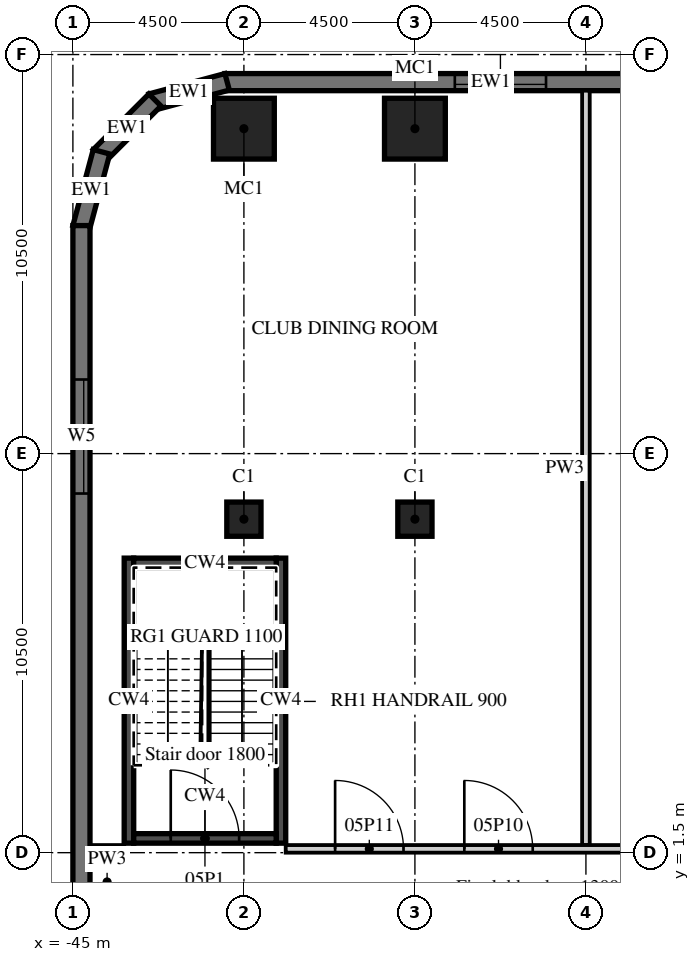
"""IFC4 building model, lengths in metres.
Left out: names, types, materials, properties, quantities, classifications, styles, units other than length and angle.
Written with IfcOpenShell. Run it as: python <this file> out.ifc"""

import sys

from ifc_helpers import new_model, si_unit, direction, frame, frame_2d, origin, origin_2d, place, context, subcontext, project, spatial, polyline, rectangle, outline, extrude, element, fill, save


model = new_model("IFC4")
c1 = context("Model", 3, precision=1e-05, world=origin(), true_north=direction((0.0, 1.0)))
c2 = subcontext(c1, "Body", "Model", "MODEL_VIEW")
j1 = project(units=[si_unit("LENGTHUNIT", "METRE"), si_unit("PLANEANGLEUNIT", "RADIAN")], contexts=[c1])
p1 = place(None, origin())
s1 = spatial("IfcSite", under=j1, at=p1, CompositionType="ELEMENT")
p2 = place(p1, origin())
s2 = spatial("IfcBuilding", under=s1, at=p2, CompositionType="ELEMENT")
p3 = place(p2, frame((0.0, 0.0, 33.5)))
s3 = spatial("IfcBuildingStorey", under=s2, at=p3, CompositionType="ELEMENT", Elevation=33.5)
for number, where, z_axis, x_axis in (
    (1, (-40.5, 20.55, 0.0), (0.0, 0.0, 1.0), (1.0, 0.0, 0.0)),
    (2, (-36.0, 20.55, 0.0), (0.0, 0.0, 1.0), (1.0, 0.0, 0.0)),
):
    element("IfcColumn", number, at=place(p3, frame(where, z_axis=z_axis, x_axis=x_axis)), inside=s3, PredefinedType="COLUMN", context=c2, shape_type="SweptSolid", body=[
        extrude(rectangle(XDim=1.6, YDim=1.6, at=origin_2d()), origin(), (0.0, 0.0, 1.0), 4.5),
    ])
for number, where, z_axis, x_axis in (
    (3, (-40.5, 10.275, 0.0), (0.0, 0.0, 1.0), (1.0, 0.0, 0.0)),
    (4, (-36.0, 10.275, 0.0), (0.0, 0.0, 1.0), (1.0, 0.0, 0.0)),
):
    element("IfcColumn", number, at=place(p3, frame(where, z_axis=z_axis, x_axis=x_axis)), inside=s3, PredefinedType="COLUMN", context=c2, shape_type="SweptSolid", body=[
        extrude(rectangle(XDim=0.9, YDim=0.9, at=origin_2d()), origin(), (0.0, 0.0, 1.0), 4.5),
    ])
p4 = place(p3, frame((-27.0, 21.775, 0.0), z_axis=(0.0, 0.0, 1.0), x_axis=(-1.0, 0.0, 0.0)))
e5 = element("IfcWall", 5, at=p4, inside=s3, PredefinedType="SOLIDWALL", context=c2, shape_type="SweptSolid", body=[
    extrude(rectangle(XDim=14.0, YDim=0.45, at=frame_2d((7.0, 0.0))), origin(), (0.0, 0.0, 1.0), 4.05),
])
p5 = place(p4, frame((1.05, 0.0, 0.9)))
e6 = element("IfcOpeningElement", 6, at=p5, cuts=e5, PredefinedType="OPENING", context=c2, shape_type="SweptSolid", body=[
    extrude(rectangle(XDim=2.4, YDim=1.8, at=frame_2d((1.2, 0.9))), frame((0.0, 0.235, 0.0), z_axis=(0.0, -1.0, 0.0), x_axis=(1.0, 0.0, 0.0)), (0.0, 0.0, 1.0), 0.47),
])
p6 = place(p4, frame((5.55, 0.0, 0.9)))
e7 = element("IfcOpeningElement", 7, at=p6, cuts=e5, PredefinedType="OPENING", context=c2, shape_type="SweptSolid", body=[
    extrude(rectangle(XDim=2.4, YDim=1.8, at=frame_2d((1.2, 0.9))), frame((0.0, 0.235, 0.0), z_axis=(0.0, -1.0, 0.0), x_axis=(1.0, 0.0, 0.0)), (0.0, 0.0, 1.0), 0.47),
])
p7 = place(p3, frame((-40.942, 21.783, 0.0), z_axis=(0.0, 0.0, 1.0), x_axis=(-0.965926999034, -0.25881466832, 0.0)))
e8 = element("IfcWall", 8, at=p7, inside=s3, PredefinedType="SOLIDWALL", context=c2, shape_type="SweptSolid", body=[
    extrude(outline(polyline([(0.0, -0.225), (2.071, -0.225), (1.95, 0.225), (0.121, 0.225), (0.0, -0.225)])), origin(), (0.0, 0.0, 1.0), 4.05),
])
p8 = place(p3, frame((-42.841, 21.305, 0.0), z_axis=(0.0, 0.0, 1.0), x_axis=(-0.707106781187, -0.707106781187, 0.0)))
e9 = element("IfcWall", 9, at=p8, inside=s3, PredefinedType="SOLIDWALL", context=c2, shape_type="SweptSolid", body=[
    extrude(outline(polyline([(0.0, -0.225), (2.071, -0.225), (1.95, 0.225), (0.121, 0.225), (0.0, -0.225)])), origin(), (0.0, 0.0, 1.0), 4.05),
])
p9 = place(p3, frame((-44.247, 19.942, 0.0), z_axis=(0.0, 0.0, 1.0), x_axis=(-0.25881466832, -0.965926999034, 0.0)))
e10 = element("IfcWall", 10, at=p9, inside=s3, PredefinedType="SOLIDWALL", context=c2, shape_type="SweptSolid", body=[
    extrude(outline(polyline([(-0.0, -0.225), (2.07, -0.225), (1.95, 0.225), (0.12, 0.225), (-0.0, -0.225)])), origin(), (0.0, 0.0, 1.0), 4.05),
])
p10 = place(p3, frame((-44.775, 18.0, 0.0), z_axis=(0.0, 0.0, 1.0), x_axis=(0.0, -1.0, 0.0)))
e11 = element("IfcWall", 11, at=p10, inside=s3, PredefinedType="SOLIDWALL", context=c2, shape_type="SweptSolid", body=[
    extrude(rectangle(XDim=36.0, YDim=0.45, at=frame_2d((18.0, 0.0))), origin(), (0.0, 0.0, 1.0), 4.05),
])
p11 = place(p10, frame((4.05, 0.0, 0.9)))
e12 = element("IfcOpeningElement", 12, at=p11, cuts=e11, PredefinedType="OPENING", context=c2, shape_type="SweptSolid", body=[
    extrude(rectangle(XDim=3.0, YDim=1.8, at=frame_2d((1.5, 0.9))), frame((0.0, 0.235, 0.0), z_axis=(0.0, -1.0, 0.0), x_axis=(1.0, 0.0, 0.0)), (0.0, 0.0, 1.0), 0.47),
])
for number, where, z_axis, x_axis in (
    (13, (-43.525, 1.75, 0.0), (0.0, 0.0, 1.0), (0.0, 1.0, 0.0)),
    (14, (-39.525, 1.75, 0.0), (0.0, 0.0, 1.0), (0.0, 1.0, 0.0)),
):
    element("IfcWall", number, at=place(p3, frame(where, z_axis=z_axis, x_axis=x_axis)), inside=s3, PredefinedType="SHEAR", context=c2, shape_type="SweptSolid", body=[
        extrude(rectangle(XDim=7.5, YDim=0.25, at=frame_2d((3.75, 0.0))), origin(), (0.0, 0.0, 1.0), 4.05),
    ])
p12 = place(p3, frame((-43.4, 9.125, 0.0), z_axis=(0.0, 0.0, 1.0), x_axis=(1.0, 0.0, 0.0)))
e15 = element("IfcWall", 15, at=p12, inside=s3, PredefinedType="SHEAR", context=c2, shape_type="SweptSolid", body=[
    extrude(rectangle(XDim=3.75, YDim=0.25, at=frame_2d((1.875, 0.0))), origin(), (0.0, 0.0, 1.0), 4.05),
])
p13 = place(p3, frame((-43.4, 1.875, 0.0), z_axis=(0.0, 0.0, 1.0), x_axis=(1.0, 0.0, 0.0)))
e16 = element("IfcWall", 16, at=p13, inside=s3, PredefinedType="SHEAR", context=c2, shape_type="SweptSolid", body=[
    extrude(rectangle(XDim=3.75, YDim=0.25, at=frame_2d((1.875, 0.0))), origin(), (0.0, 0.0, 1.0), 4.05),
])
p14 = place(p13, frame((0.975, 0.0, 0.0)))
e17 = element("IfcOpeningElement", 17, at=p14, cuts=e16, PredefinedType="OPENING", context=c2, shape_type="SweptSolid", body=[
    extrude(rectangle(XDim=1.8, YDim=2.1, at=frame_2d((0.9, 1.05))), frame((0.0, 0.135, 0.0), z_axis=(0.0, -1.0, 0.0), x_axis=(1.0, 0.0, 0.0)), (0.0, 0.0, 1.0), 0.27),
])
p15 = place(p3, frame((-31.5, 1.7, 0.0), z_axis=(0.0, 0.0, 1.0), x_axis=(0.0, 1.0, 0.0)))
e18 = element("IfcWall", 18, at=p15, inside=s3, PredefinedType="PARTITIONING", context=c2, shape_type="SweptSolid", body=[
    extrude(rectangle(XDim=19.85, YDim=0.2, at=frame_2d((9.925, 0.0))), origin(), (0.0, 0.0, 1.0), 4.05),
])
p16 = place(p3, frame((-39.4, 1.6, 0.0), z_axis=(0.0, 0.0, 1.0), x_axis=(1.0, 0.0, 0.0)))
e19 = element("IfcWall", 19, at=p16, inside=s3, PredefinedType="PARTITIONING", context=c2, shape_type="SweptSolid", body=[
    extrude(rectangle(XDim=52.7, YDim=0.2, at=frame_2d((26.35, 0.0))), origin(), (0.0, 0.0, 1.0), 4.05),
])
p17 = place(p16, frame((47.45, 0.0, 0.0)))
e20 = element("IfcOpeningElement", 20, at=p17, cuts=e19, PredefinedType="OPENING", context=c2, shape_type="SweptSolid", body=[
    extrude(rectangle(XDim=1.8, YDim=2.1, at=frame_2d((0.9, 1.05))), frame((0.0, 0.11, 0.0), z_axis=(0.0, -1.0, 0.0), x_axis=(1.0, 0.0, 0.0)), (0.0, 0.0, 1.0), 0.22),
])
p18 = place(p16, frame((41.375, 0.0, 0.0)))
e21 = element("IfcOpeningElement", 21, at=p18, cuts=e19, PredefinedType="OPENING", context=c2, shape_type="SweptSolid", body=[
    extrude(rectangle(XDim=1.2, YDim=2.1, at=frame_2d((0.6, 1.05))), frame((0.0, 0.11, 0.0), z_axis=(0.0, -1.0, 0.0), x_axis=(1.0, 0.0, 0.0)), (0.0, 0.0, 1.0), 0.22),
])
p19 = place(p16, frame((25.86, 0.0, 0.0)))
e22 = element("IfcOpeningElement", 22, at=p19, cuts=e19, PredefinedType="OPENING", context=c2, shape_type="SweptSolid", body=[
    extrude(rectangle(XDim=1.8, YDim=2.1, at=frame_2d((0.9, 1.05))), frame((0.0, 0.11, 0.0), z_axis=(0.0, -1.0, 0.0), x_axis=(1.0, 0.0, 0.0)), (0.0, 0.0, 1.0), 0.22),
])
p20 = place(p16, frame((15.14, 0.0, 0.0)))
e23 = element("IfcOpeningElement", 23, at=p20, cuts=e19, PredefinedType="OPENING", context=c2, shape_type="SweptSolid", body=[
    extrude(rectangle(XDim=1.8, YDim=2.1, at=frame_2d((0.9, 1.05))), frame((0.0, 0.11, 0.0), z_axis=(0.0, -1.0, 0.0), x_axis=(1.0, 0.0, 0.0)), (0.0, 0.0, 1.0), 0.22),
])
p21 = place(p16, frame((4.7, 0.0, 0.0)))
e24 = element("IfcOpeningElement", 24, at=p21, cuts=e19, PredefinedType="OPENING", context=c2, shape_type="SweptSolid", body=[
    extrude(rectangle(XDim=1.8, YDim=2.1, at=frame_2d((0.9, 1.05))), frame((0.0, 0.11, 0.0), z_axis=(0.0, -1.0, 0.0), x_axis=(1.0, 0.0, 0.0)), (0.0, 0.0, 1.0), 0.22),
])
p22 = place(p16, frame((1.3, 0.0, 0.0)))
e25 = element("IfcOpeningElement", 25, at=p22, cuts=e19, PredefinedType="OPENING", context=c2, shape_type="SweptSolid", body=[
    extrude(rectangle(XDim=1.8, YDim=2.1, at=frame_2d((0.9, 1.05))), frame((0.0, 0.11, 0.0), z_axis=(0.0, -1.0, 0.0), x_axis=(1.0, 0.0, 0.0)), (0.0, 0.0, 1.0), 0.22),
])
p23 = place(p3, frame((-44.55, 1.6, 0.0), z_axis=(0.0, 0.0, 1.0), x_axis=(1.0, 0.0, 0.0)))
e26 = element("IfcWall", 26, at=p23, inside=s3, PredefinedType="PARTITIONING", context=c2, shape_type="SweptSolid", body=[
    extrude(rectangle(XDim=0.9, YDim=0.2, at=frame_2d((0.45, 0.0))), origin(), (0.0, 0.0, 1.0), 4.05),
])
p24 = place(p6, origin())
e27 = element("IfcWindow", 27, at=p24, inside=s3, PartitioningType="SINGLE_PANEL", PredefinedType="WINDOW", context=c2, shape_type="SweptSolid", body=[
    extrude(rectangle(XDim=2.4, YDim=1.8, at=frame_2d((1.2, 0.9))), frame((0.0, 0.09, 0.0), z_axis=(0.0, -1.0, 0.0), x_axis=(1.0, 0.0, 0.0)), (0.0, 0.0, 1.0), 0.06),
])
fill(e7, e27)
p25 = place(p11, origin())
e28 = element("IfcWindow", 28, at=p25, inside=s3, PartitioningType="SINGLE_PANEL", PredefinedType="WINDOW", context=c2, shape_type="SweptSolid", body=[
    extrude(rectangle(XDim=3.0, YDim=1.8, at=frame_2d((1.5, 0.9))), frame((0.0, 0.09, 0.0), z_axis=(0.0, -1.0, 0.0), x_axis=(1.0, 0.0, 0.0)), (0.0, 0.0, 1.0), 0.06),
])
fill(e12, e28)
p26 = place(p14, origin())
e29 = element("IfcDoor", 29, at=p26, inside=s3, OperationType="DOUBLE_DOOR_DOUBLE_SWING", PredefinedType="DOOR", context=c2, shape_type="SweptSolid", body=[
    extrude(rectangle(XDim=1.8, YDim=2.1, at=frame_2d((0.9, 1.05))), frame((0.0, 0.025, 0.0), z_axis=(0.0, -1.0, 0.0), x_axis=(1.0, 0.0, 0.0)), (0.0, 0.0, 1.0), 0.05),
])
fill(e17, e29)
p27 = place(p21, origin())
e30 = element("IfcDoor", 30, at=p27, inside=s3, OperationType="DOUBLE_DOOR_DOUBLE_SWING", PredefinedType="DOOR", context=c2, shape_type="SweptSolid", body=[
    extrude(rectangle(XDim=1.8, YDim=2.1, at=frame_2d((0.9, 1.05))), frame((0.0, 0.025, 0.0), z_axis=(0.0, -1.0, 0.0), x_axis=(1.0, 0.0, 0.0)), (0.0, 0.0, 1.0), 0.05),
])
fill(e24, e30)
p28 = place(p22, origin())
e31 = element("IfcDoor", 31, at=p28, inside=s3, OperationType="DOUBLE_DOOR_DOUBLE_SWING", PredefinedType="DOOR", context=c2, shape_type="SweptSolid", body=[
    extrude(rectangle(XDim=1.8, YDim=2.1, at=frame_2d((0.9, 1.05))), frame((0.0, 0.025, 0.0), z_axis=(0.0, -1.0, 0.0), x_axis=(1.0, 0.0, 0.0)), (0.0, 0.0, 1.0), 0.05),
])
fill(e25, e31)
save(model, sys.argv[1])
